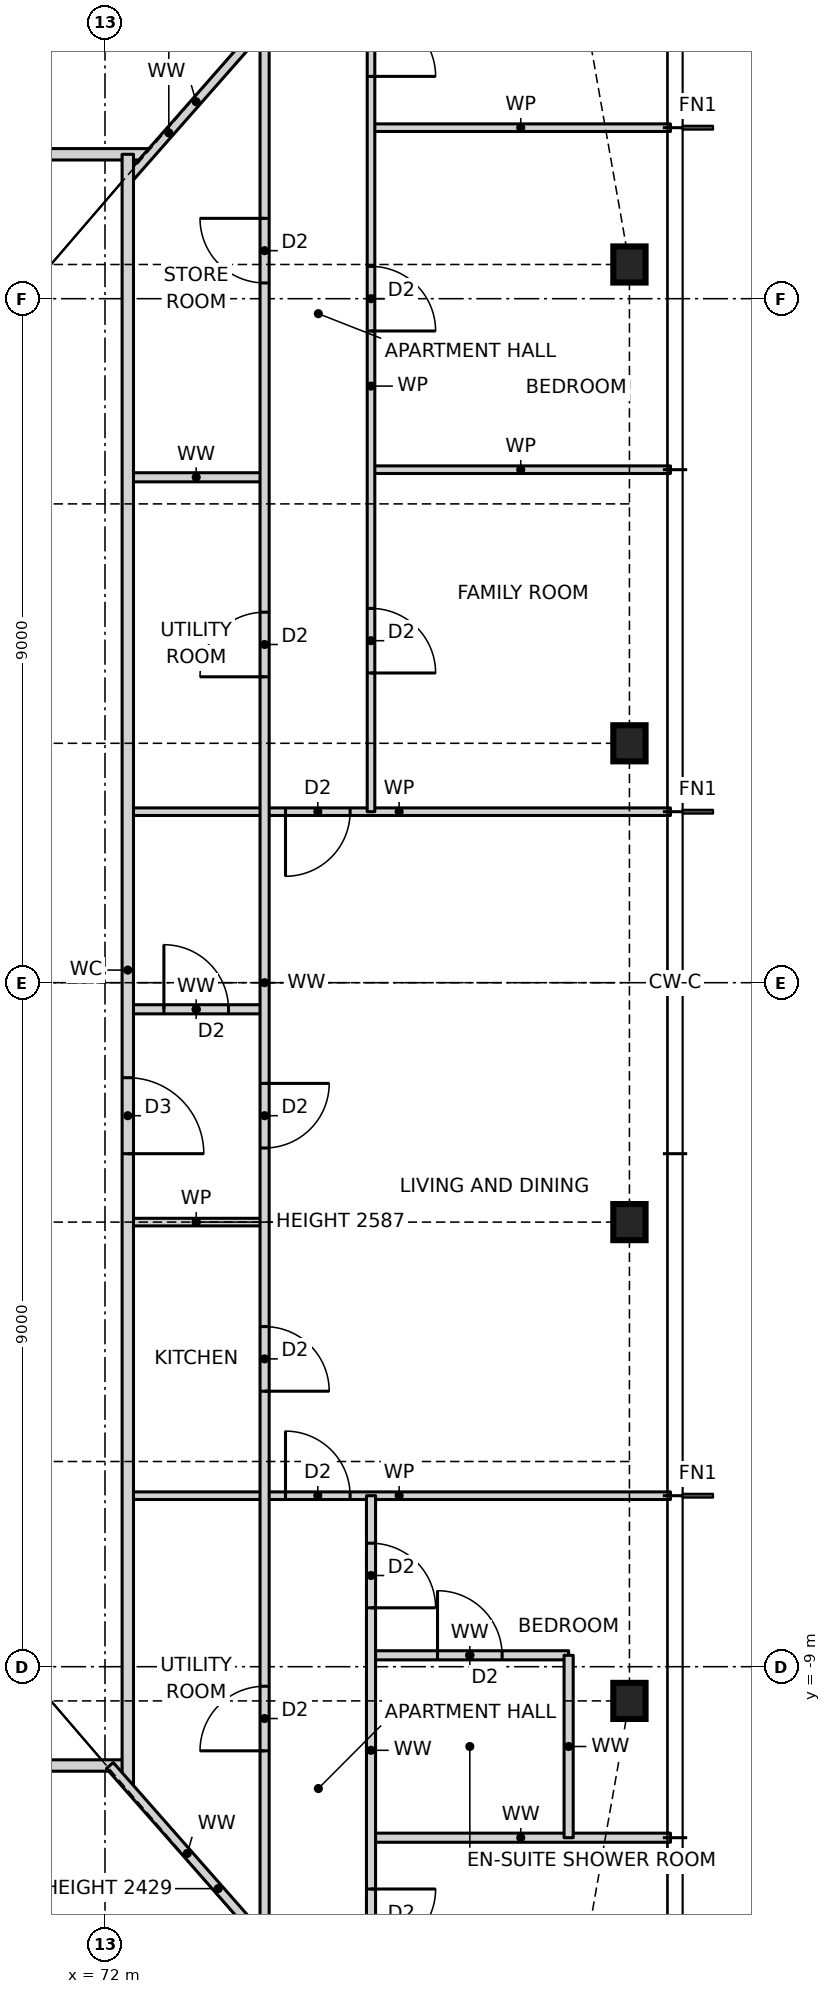
"""IFC4 building model, lengths in metres.
Left out: names, types, materials, properties, quantities, classifications, styles, units other than length and angle.
Written with IfcOpenShell. Run it as: python <this file> out.ifc"""

import sys

from ifc_helpers import new_model, si_unit, direction, frame, frame_2d, origin, origin_2d, place, context, subcontext, project, spatial, rectangle, i_section, extrude, element, fill, save


model = new_model("IFC4")
c1 = context("Model", 3, precision=1e-05, world=origin(), true_north=direction((0.0, 1.0)))
c2 = subcontext(c1, "Body", "Model", "MODEL_VIEW")
j1 = project(units=[si_unit("LENGTHUNIT", "METRE"), si_unit("PLANEANGLEUNIT", "RADIAN")], contexts=[c1])
p1 = place(None, origin())
s1 = spatial("IfcSite", under=j1, at=p1, CompositionType="ELEMENT")
p2 = place(p1, origin())
s2 = spatial("IfcBuilding", under=s1, at=p2, CompositionType="ELEMENT")
p3 = place(p2, frame((0.0, 0.0, 39.5)))
s3 = spatial("IfcBuildingStorey", under=s2, at=p3, CompositionType="ELEMENT", Elevation=39.5)
for number, where, z_axis, x_axis in (
    (1, (78.9, -9.45, 0.0), (0.0, 0.0, 1.0), (1.0, 0.0, 0.0)),
    (2, (78.9, -3.15, 0.0), (0.0, 0.0, 1.0), (1.0, 0.0, 0.0)),
    (3, (78.9, 3.15, 0.0), (0.0, 0.0, 1.0), (1.0, 0.0, 0.0)),
    (4, (78.9, 9.45, 0.0), (0.0, 0.0, 1.0), (1.0, 0.0, 0.0)),
):
    element("IfcColumn", number, at=place(p3, frame(where, z_axis=z_axis, x_axis=x_axis)), inside=s3, PredefinedType="COLUMN", context=c2, shape_type="SweptSolid", body=[
        extrude(i_section(OverallWidth=0.424, OverallDepth=0.475, WebThickness=0.048, FlangeThickness=0.077, at=origin_2d()), origin(), (0.0, 0.0, 1.0), 3.5),
    ])
p4 = place(p3, frame((75.5, -11.25, 0.0), z_axis=(0.0, 0.0, 1.0), x_axis=(1.0, 0.0, 0.0)))
e5 = element("IfcWall", 5, at=p4, inside=s3, PredefinedType="PARTITIONING", context=c2, shape_type="SweptSolid", body=[
    extrude(rectangle(XDim=3.94, YDim=0.12, at=frame_2d((1.97, 0.0))), origin(), (0.0, 0.0, 1.0), 3.27),
])
p5 = place(p3, frame((53.7, -10.3, 0.0), z_axis=(0.0, 0.0, 1.0), x_axis=(1.0, 0.0, 0.0)))
e6 = element("IfcWall", 6, at=p5, inside=s3, PredefinedType="PARTITIONING", context=c2, shape_type="SweptSolid", body=[
    extrude(rectangle(XDim=18.6, YDim=0.15, at=frame_2d((9.3, 0.0))), origin(), (0.0, 0.0, 1.0), 3.27),
])
p6 = place(p5, frame((4.8, 0.0, 0.0)))
e7 = element("IfcOpeningElement", 7, at=p6, cuts=e6, PredefinedType="OPENING", context=c2, shape_type="SweptSolid", body=[
    extrude(rectangle(XDim=1.0, YDim=2.1, at=frame_2d((0.5, 1.05))), frame((0.0, 0.085, 0.0), z_axis=(0.0, -1.0, 0.0), x_axis=(1.0, 0.0, 0.0)), (0.0, 0.0, 1.0), 0.17),
])
p7 = place(p3, frame((75.5, -8.85, 0.0), z_axis=(0.0, 0.0, 1.0), x_axis=(1.0, 0.0, 0.0)))
e8 = element("IfcWall", 8, at=p7, inside=s3, PredefinedType="PARTITIONING", context=c2, shape_type="SweptSolid", body=[
    extrude(rectangle(XDim=2.6, YDim=0.12, at=frame_2d((1.3, 0.0))), origin(), (0.0, 0.0, 1.0), 3.27),
])
p8 = place(p7, frame((0.875, 0.0, 0.0)))
e9 = element("IfcOpeningElement", 9, at=p8, cuts=e8, PredefinedType="OPENING", context=c2, shape_type="SweptSolid", body=[
    extrude(rectangle(XDim=0.85, YDim=2.1, at=frame_2d((0.425, 1.05))), frame((0.0, 0.07, 0.0), z_axis=(0.0, -1.0, 0.0), x_axis=(1.0, 0.0, 0.0)), (0.0, 0.0, 1.0), 0.14),
])
p9 = place(p3, frame((72.3, -6.75, 0.0), z_axis=(0.0, 0.0, 1.0), x_axis=(1.0, 0.0, 0.0)))
e10 = element("IfcWall", 10, at=p9, inside=s3, PredefinedType="PARTITIONING", context=c2, shape_type="SweptSolid", body=[
    extrude(rectangle(XDim=7.14, YDim=0.1, at=frame_2d((3.57, 0.0))), origin(), (0.0, 0.0, 1.0), 3.27),
])
p10 = place(p9, frame((2.075, 0.0, 0.0)))
e11 = element("IfcOpeningElement", 11, at=p10, cuts=e10, PredefinedType="OPENING", context=c2, shape_type="SweptSolid", body=[
    extrude(rectangle(XDim=0.85, YDim=2.1, at=frame_2d((0.425, 1.05))), frame((0.0, 0.06, 0.0), z_axis=(0.0, -1.0, 0.0), x_axis=(1.0, 0.0, 0.0)), (0.0, 0.0, 1.0), 0.12),
])
p11 = place(p3, frame((72.3, -3.15, 0.0), z_axis=(0.0, 0.0, 1.0), x_axis=(1.0, 0.0, 0.0)))
e12 = element("IfcWall", 12, at=p11, inside=s3, PredefinedType="PARTITIONING", context=c2, shape_type="SweptSolid", body=[
    extrude(rectangle(XDim=1.8, YDim=0.1, at=frame_2d((0.9, 0.0))), origin(), (0.0, 0.0, 1.0), 2.587),
])
p12 = place(p3, frame((72.3, -0.35, 0.0), z_axis=(0.0, 0.0, 1.0), x_axis=(1.0, 0.0, 0.0)))
e13 = element("IfcWall", 13, at=p12, inside=s3, PredefinedType="PARTITIONING", context=c2, shape_type="SweptSolid", body=[
    extrude(rectangle(XDim=1.8, YDim=0.12, at=frame_2d((0.9, 0.0))), origin(), (0.0, 0.0, 1.0), 3.27),
])
p13 = place(p12, frame((0.475, 0.0, 0.0)))
e14 = element("IfcOpeningElement", 14, at=p13, cuts=e13, PredefinedType="OPENING", context=c2, shape_type="SweptSolid", body=[
    extrude(rectangle(XDim=0.85, YDim=2.1, at=frame_2d((0.425, 1.05))), frame((0.0, 0.07, 0.0), z_axis=(0.0, -1.0, 0.0), x_axis=(1.0, 0.0, 0.0)), (0.0, 0.0, 1.0), 0.14),
])
p14 = place(p3, frame((72.3, 2.25, 0.0), z_axis=(0.0, 0.0, 1.0), x_axis=(1.0, 0.0, 0.0)))
e15 = element("IfcWall", 15, at=p14, inside=s3, PredefinedType="PARTITIONING", context=c2, shape_type="SweptSolid", body=[
    extrude(rectangle(XDim=7.14, YDim=0.1, at=frame_2d((3.57, 0.0))), origin(), (0.0, 0.0, 1.0), 3.27),
])
p15 = place(p14, frame((2.075, 0.0, 0.0)))
e16 = element("IfcOpeningElement", 16, at=p15, cuts=e15, PredefinedType="OPENING", context=c2, shape_type="SweptSolid", body=[
    extrude(rectangle(XDim=0.85, YDim=2.1, at=frame_2d((0.425, 1.05))), frame((0.0, 0.06, 0.0), z_axis=(0.0, -1.0, 0.0), x_axis=(1.0, 0.0, 0.0)), (0.0, 0.0, 1.0), 0.12),
])
p16 = place(p3, frame((72.3, 6.65, 0.0), z_axis=(0.0, 0.0, 1.0), x_axis=(1.0, 0.0, 0.0)))
e17 = element("IfcWall", 17, at=p16, inside=s3, PredefinedType="PARTITIONING", context=c2, shape_type="SweptSolid", body=[
    extrude(rectangle(XDim=1.8, YDim=0.12, at=frame_2d((0.9, 0.0))), origin(), (0.0, 0.0, 1.0), 3.27),
])
p17 = place(p3, frame((75.5, 6.75, 0.0), z_axis=(0.0, 0.0, 1.0), x_axis=(1.0, 0.0, 0.0)))
e18 = element("IfcWall", 18, at=p17, inside=s3, PredefinedType="PARTITIONING", context=c2, shape_type="SweptSolid", body=[
    extrude(rectangle(XDim=3.94, YDim=0.1, at=frame_2d((1.97, 0.0))), origin(), (0.0, 0.0, 1.0), 3.27),
])
p18 = place(p3, frame((53.408, 10.9, 0.0), z_axis=(0.0, 0.0, 1.0), x_axis=(1.0, 0.0, 0.0)))
e19 = element("IfcWall", 19, at=p18, inside=s3, PredefinedType="PARTITIONING", context=c2, shape_type="SweptSolid", body=[
    extrude(rectangle(XDim=19.184, YDim=0.15, at=frame_2d((9.592, 0.0))), origin(), (0.0, 0.0, 1.0), 3.27),
])
p19 = place(p18, frame((8.592, 0.0, 0.0)))
e20 = element("IfcOpeningElement", 20, at=p19, cuts=e19, PredefinedType="OPENING", context=c2, shape_type="SweptSolid", body=[
    extrude(rectangle(XDim=1.0, YDim=2.1, at=frame_2d((0.5, 1.05))), frame((0.0, 0.085, 0.0), z_axis=(0.0, -1.0, 0.0), x_axis=(1.0, 0.0, 0.0)), (0.0, 0.0, 1.0), 0.17),
])
p20 = place(p3, frame((75.5, 11.25, 0.0), z_axis=(0.0, 0.0, 1.0), x_axis=(1.0, 0.0, 0.0)))
e21 = element("IfcWall", 21, at=p20, inside=s3, PredefinedType="PARTITIONING", context=c2, shape_type="SweptSolid", body=[
    extrude(rectangle(XDim=3.94, YDim=0.1, at=frame_2d((1.97, 0.0))), origin(), (0.0, 0.0, 1.0), 3.27),
])
p21 = place(p3, frame((72.299, 10.569, 0.0), z_axis=(0.0, 0.0, 1.0), x_axis=(0.660797520752, 0.750564212155, 0.0)))
e22 = element("IfcWall", 22, at=p21, inside=s3, PredefinedType="PARTITIONING", context=c2, shape_type="SweptSolid", body=[
    extrude(rectangle(XDim=2.725, YDim=0.12, at=frame_2d((1.363, 0.0))), origin(), (0.0, 0.0, 1.0), 2.429),
])
p22 = place(p3, frame((78.1, -11.25, 0.0), z_axis=(0.0, 0.0, 1.0), x_axis=(0.0, 1.0, 0.0)))
e23 = element("IfcWall", 23, at=p22, inside=s3, PredefinedType="PARTITIONING", context=c2, shape_type="SweptSolid", body=[
    extrude(rectangle(XDim=2.4, YDim=0.12, at=frame_2d((1.2, 0.0))), origin(), (0.0, 0.0, 1.0), 3.27),
])
p23 = place(p3, frame((75.5, -13.45, 0.0), z_axis=(0.0, 0.0, 1.0), x_axis=(0.0, 1.0, 0.0)))
e24 = element("IfcWall", 24, at=p23, inside=s3, PredefinedType="PARTITIONING", context=c2, shape_type="SweptSolid", body=[
    extrude(rectangle(XDim=6.7, YDim=0.12, at=frame_2d((3.35, 0.0))), origin(), (0.0, 0.0, 1.0), 3.27),
])
p24 = place(p23, frame((5.225, 0.0, 0.0)))
e25 = element("IfcOpeningElement", 25, at=p24, cuts=e24, PredefinedType="OPENING", context=c2, shape_type="SweptSolid", body=[
    extrude(rectangle(XDim=0.85, YDim=2.1, at=frame_2d((0.425, 1.05))), frame((0.0, 0.07, 0.0), z_axis=(0.0, -1.0, 0.0), x_axis=(1.0, 0.0, 0.0)), (0.0, 0.0, 1.0), 0.14),
])
p25 = place(p23, frame((0.675, 0.0, 0.0)))
e26 = element("IfcOpeningElement", 26, at=p25, cuts=e24, PredefinedType="OPENING", context=c2, shape_type="SweptSolid", body=[
    extrude(rectangle(XDim=0.85, YDim=2.1, at=frame_2d((0.425, 1.05))), frame((0.0, 0.07, 0.0), z_axis=(0.0, -1.0, 0.0), x_axis=(1.0, 0.0, 0.0)), (0.0, 0.0, 1.0), 0.14),
])
p26 = place(p3, frame((75.5, 2.25, 0.0), z_axis=(0.0, 0.0, 1.0), x_axis=(0.0, 1.0, 0.0)))
e27 = element("IfcWall", 27, at=p26, inside=s3, PredefinedType="PARTITIONING", context=c2, shape_type="SweptSolid", body=[
    extrude(rectangle(XDim=11.2, YDim=0.1, at=frame_2d((5.6, 0.0))), origin(), (0.0, 0.0, 1.0), 3.27),
])
p27 = place(p26, frame((1.825, 0.0, 0.0)))
e28 = element("IfcOpeningElement", 28, at=p27, cuts=e27, PredefinedType="OPENING", context=c2, shape_type="SweptSolid", body=[
    extrude(rectangle(XDim=0.85, YDim=2.1, at=frame_2d((0.425, 1.05))), frame((0.0, 0.06, 0.0), z_axis=(0.0, -1.0, 0.0), x_axis=(1.0, 0.0, 0.0)), (0.0, 0.0, 1.0), 0.12),
])
p28 = place(p26, frame((6.325, 0.0, 0.0)))
e29 = element("IfcOpeningElement", 29, at=p28, cuts=e27, PredefinedType="OPENING", context=c2, shape_type="SweptSolid", body=[
    extrude(rectangle(XDim=0.85, YDim=2.1, at=frame_2d((0.425, 1.05))), frame((0.0, 0.06, 0.0), z_axis=(0.0, -1.0, 0.0), x_axis=(1.0, 0.0, 0.0)), (0.0, 0.0, 1.0), 0.12),
])
p29 = place(p26, frame((9.675, 0.0, 0.0)))
e30 = element("IfcOpeningElement", 30, at=p29, cuts=e27, PredefinedType="OPENING", context=c2, shape_type="SweptSolid", body=[
    extrude(rectangle(XDim=0.85, YDim=2.1, at=frame_2d((0.425, 1.05))), frame((0.0, 0.06, 0.0), z_axis=(0.0, -1.0, 0.0), x_axis=(1.0, 0.0, 0.0)), (0.0, 0.0, 1.0), 0.12),
])
p30 = place(p3, frame((74.1, -12.614, 0.0), z_axis=(0.0, 0.0, 1.0), x_axis=(0.0, 1.0, 0.0)))
e31 = element("IfcWall", 31, at=p30, inside=s3, PredefinedType="PARTITIONING", context=c2, shape_type="SweptSolid", body=[
    extrude(rectangle(XDim=25.228, YDim=0.12, at=frame_2d((12.614, 0.0))), origin(), (0.0, 0.0, 1.0), 3.27),
])
p31 = place(p30, frame((7.239, 0.0, 0.0)))
e32 = element("IfcOpeningElement", 32, at=p31, cuts=e31, PredefinedType="OPENING", context=c2, shape_type="SweptSolid", body=[
    extrude(rectangle(XDim=0.85, YDim=2.1, at=frame_2d((0.425, 1.05))), frame((0.0, 0.07, 0.0), z_axis=(0.0, -1.0, 0.0), x_axis=(1.0, 0.0, 0.0)), (0.0, 0.0, 1.0), 0.14),
])
p32 = place(p30, frame((10.439, 0.0, 0.0)))
e33 = element("IfcOpeningElement", 33, at=p32, cuts=e31, PredefinedType="OPENING", context=c2, shape_type="SweptSolid", body=[
    extrude(rectangle(XDim=0.85, YDim=2.1, at=frame_2d((0.425, 1.05))), frame((0.0, 0.07, 0.0), z_axis=(0.0, -1.0, 0.0), x_axis=(1.0, 0.0, 0.0)), (0.0, 0.0, 1.0), 0.14),
])
p33 = place(p30, frame((2.507, 0.0, 0.0)))
e34 = element("IfcOpeningElement", 34, at=p33, cuts=e31, PredefinedType="OPENING", context=c2, shape_type="SweptSolid", body=[
    extrude(rectangle(XDim=0.85, YDim=2.1, at=frame_2d((0.425, 1.05))), frame((0.0, 0.07, 0.0), z_axis=(0.0, -1.0, 0.0), x_axis=(1.0, 0.0, 0.0)), (0.0, 0.0, 1.0), 0.14),
])
p34 = place(p30, frame((16.639, 0.0, 0.0)))
e35 = element("IfcOpeningElement", 35, at=p34, cuts=e31, PredefinedType="OPENING", context=c2, shape_type="SweptSolid", body=[
    extrude(rectangle(XDim=0.85, YDim=2.1, at=frame_2d((0.425, 1.05))), frame((0.0, 0.07, 0.0), z_axis=(0.0, -1.0, 0.0), x_axis=(1.0, 0.0, 0.0)), (0.0, 0.0, 1.0), 0.14),
])
p35 = place(p30, frame((21.821, 0.0, 0.0)))
e36 = element("IfcOpeningElement", 36, at=p35, cuts=e31, PredefinedType="OPENING", context=c2, shape_type="SweptSolid", body=[
    extrude(rectangle(XDim=0.85, YDim=2.1, at=frame_2d((0.425, 1.05))), frame((0.0, 0.07, 0.0), z_axis=(0.0, -1.0, 0.0), x_axis=(1.0, 0.0, 0.0)), (0.0, 0.0, 1.0), 0.14),
])
p36 = place(p3, frame((72.3, -10.568, 0.0), z_axis=(0.0, 0.0, 1.0), x_axis=(0.0, 1.0, 0.0)))
e37 = element("IfcWall", 37, at=p36, inside=s3, PredefinedType="PARTITIONING", context=c2, shape_type="SweptSolid", body=[
    extrude(rectangle(XDim=21.468, YDim=0.15, at=frame_2d((10.734, 0.0))), origin(), (0.0, 0.0, 1.0), 3.27),
])
p37 = place(p36, frame((8.318, 0.0, 0.0)))
e38 = element("IfcOpeningElement", 38, at=p37, cuts=e37, PredefinedType="OPENING", context=c2, shape_type="SweptSolid", body=[
    extrude(rectangle(XDim=1.0, YDim=2.1, at=frame_2d((0.5, 1.05))), frame((0.0, 0.085, 0.0), z_axis=(0.0, -1.0, 0.0), x_axis=(1.0, 0.0, 0.0)), (0.0, 0.0, 1.0), 0.17),
])
p38 = place(p3, frame((74.1, -12.614, 0.0), z_axis=(0.0, 0.0, 1.0), x_axis=(-0.660767161141, 0.750590939699, 0.0)))
e39 = element("IfcWall", 39, at=p38, inside=s3, PredefinedType="PARTITIONING", context=c2, shape_type="SweptSolid", body=[
    extrude(rectangle(XDim=3.082, YDim=0.12, at=frame_2d((1.541, 0.0))), origin(), (0.0, 0.0, 1.0), 2.429),
])
p39 = place(p31, frame((0.85, 0.0, 0.0), z_axis=(0.0, 0.0, 1.0), x_axis=(-1.0, 0.0, 0.0)))
e40 = element("IfcDoor", 40, at=p39, inside=s3, OperationType="SINGLE_SWING_RIGHT", PredefinedType="DOOR", context=c2, shape_type="SweptSolid", body=[
    extrude(rectangle(XDim=0.85, YDim=2.1, at=frame_2d((0.425, 1.05))), frame((0.0, 0.025, 0.0), z_axis=(0.0, -1.0, 0.0), x_axis=(1.0, 0.0, 0.0)), (0.0, 0.0, 1.0), 0.05),
])
fill(e32, e40)
p40 = place(p37, frame((1.0, 0.0, 0.0), z_axis=(0.0, 0.0, 1.0), x_axis=(-1.0, 0.0, 0.0)))
e41 = element("IfcDoor", 41, at=p40, inside=s3, OperationType="SINGLE_SWING_RIGHT", PredefinedType="DOOR", context=c2, shape_type="SweptSolid", body=[
    extrude(rectangle(XDim=1.0, YDim=2.1, at=frame_2d((0.5, 1.05))), frame((0.0, 0.025, 0.0), z_axis=(0.0, -1.0, 0.0), x_axis=(1.0, 0.0, 0.0)), (0.0, 0.0, 1.0), 0.05),
])
fill(e38, e41)
p41 = place(p32, frame((0.85, 0.0, 0.0), z_axis=(0.0, 0.0, 1.0), x_axis=(-1.0, 0.0, 0.0)))
e42 = element("IfcDoor", 42, at=p41, inside=s3, OperationType="SINGLE_SWING_LEFT", PredefinedType="DOOR", context=c2, shape_type="SweptSolid", body=[
    extrude(rectangle(XDim=0.85, YDim=2.1, at=frame_2d((0.425, 1.05))), frame((0.0, 0.025, 0.0), z_axis=(0.0, -1.0, 0.0), x_axis=(1.0, 0.0, 0.0)), (0.0, 0.0, 1.0), 0.05),
])
fill(e33, e42)
p42 = place(p13, origin())
e43 = element("IfcDoor", 43, at=p42, inside=s3, OperationType="SINGLE_SWING_LEFT", PredefinedType="DOOR", context=c2, shape_type="SweptSolid", body=[
    extrude(rectangle(XDim=0.85, YDim=2.1, at=frame_2d((0.425, 1.05))), frame((0.0, 0.025, 0.0), z_axis=(0.0, -1.0, 0.0), x_axis=(1.0, 0.0, 0.0)), (0.0, 0.0, 1.0), 0.05),
])
fill(e14, e43)
p43 = place(p10, origin())
e44 = element("IfcDoor", 44, at=p43, inside=s3, OperationType="SINGLE_SWING_LEFT", PredefinedType="DOOR", context=c2, shape_type="SweptSolid", body=[
    extrude(rectangle(XDim=0.85, YDim=2.1, at=frame_2d((0.425, 1.05))), frame((0.0, 0.025, 0.0), z_axis=(0.0, -1.0, 0.0), x_axis=(1.0, 0.0, 0.0)), (0.0, 0.0, 1.0), 0.05),
])
fill(e11, e44)
p44 = place(p8, origin())
e45 = element("IfcDoor", 45, at=p44, inside=s3, OperationType="SINGLE_SWING_LEFT", PredefinedType="DOOR", context=c2, shape_type="SweptSolid", body=[
    extrude(rectangle(XDim=0.85, YDim=2.1, at=frame_2d((0.425, 1.05))), frame((0.0, 0.025, 0.0), z_axis=(0.0, -1.0, 0.0), x_axis=(1.0, 0.0, 0.0)), (0.0, 0.0, 1.0), 0.05),
])
fill(e9, e45)
p45 = place(p24, frame((0.85, 0.0, 0.0), z_axis=(0.0, 0.0, 1.0), x_axis=(-1.0, 0.0, 0.0)))
e46 = element("IfcDoor", 46, at=p45, inside=s3, OperationType="SINGLE_SWING_RIGHT", PredefinedType="DOOR", context=c2, shape_type="SweptSolid", body=[
    extrude(rectangle(XDim=0.85, YDim=2.1, at=frame_2d((0.425, 1.05))), frame((0.0, 0.025, 0.0), z_axis=(0.0, -1.0, 0.0), x_axis=(1.0, 0.0, 0.0)), (0.0, 0.0, 1.0), 0.05),
])
fill(e25, e46)
p46 = place(p25, frame((0.85, 0.0, 0.0), z_axis=(0.0, 0.0, 1.0), x_axis=(-1.0, 0.0, 0.0)))
e47 = element("IfcDoor", 47, at=p46, inside=s3, OperationType="SINGLE_SWING_LEFT", PredefinedType="DOOR", context=c2, shape_type="SweptSolid", body=[
    extrude(rectangle(XDim=0.85, YDim=2.1, at=frame_2d((0.425, 1.05))), frame((0.0, 0.025, 0.0), z_axis=(0.0, -1.0, 0.0), x_axis=(1.0, 0.0, 0.0)), (0.0, 0.0, 1.0), 0.05),
])
fill(e26, e47)
p47 = place(p33, origin())
e48 = element("IfcDoor", 48, at=p47, inside=s3, OperationType="SINGLE_SWING_LEFT", PredefinedType="DOOR", context=c2, shape_type="SweptSolid", body=[
    extrude(rectangle(XDim=0.85, YDim=2.1, at=frame_2d((0.425, 1.05))), frame((0.0, 0.025, 0.0), z_axis=(0.0, -1.0, 0.0), x_axis=(1.0, 0.0, 0.0)), (0.0, 0.0, 1.0), 0.05),
])
fill(e34, e48)
p48 = place(p15, frame((0.85, 0.0, 0.0), z_axis=(0.0, 0.0, 1.0), x_axis=(-1.0, 0.0, 0.0)))
e49 = element("IfcDoor", 49, at=p48, inside=s3, OperationType="SINGLE_SWING_RIGHT", PredefinedType="DOOR", context=c2, shape_type="SweptSolid", body=[
    extrude(rectangle(XDim=0.85, YDim=2.1, at=frame_2d((0.425, 1.05))), frame((0.0, 0.025, 0.0), z_axis=(0.0, -1.0, 0.0), x_axis=(1.0, 0.0, 0.0)), (0.0, 0.0, 1.0), 0.05),
])
fill(e16, e49)
p49 = place(p27, frame((0.85, 0.0, 0.0), z_axis=(0.0, 0.0, 1.0), x_axis=(-1.0, 0.0, 0.0)))
e50 = element("IfcDoor", 50, at=p49, inside=s3, OperationType="SINGLE_SWING_RIGHT", PredefinedType="DOOR", context=c2, shape_type="SweptSolid", body=[
    extrude(rectangle(XDim=0.85, YDim=2.1, at=frame_2d((0.425, 1.05))), frame((0.0, 0.025, 0.0), z_axis=(0.0, -1.0, 0.0), x_axis=(1.0, 0.0, 0.0)), (0.0, 0.0, 1.0), 0.05),
])
fill(e28, e50)
p50 = place(p28, frame((0.85, 0.0, 0.0), z_axis=(0.0, 0.0, 1.0), x_axis=(-1.0, 0.0, 0.0)))
e51 = element("IfcDoor", 51, at=p50, inside=s3, OperationType="SINGLE_SWING_RIGHT", PredefinedType="DOOR", context=c2, shape_type="SweptSolid", body=[
    extrude(rectangle(XDim=0.85, YDim=2.1, at=frame_2d((0.425, 1.05))), frame((0.0, 0.025, 0.0), z_axis=(0.0, -1.0, 0.0), x_axis=(1.0, 0.0, 0.0)), (0.0, 0.0, 1.0), 0.05),
])
fill(e29, e51)
p51 = place(p29, frame((0.85, 0.0, 0.0), z_axis=(0.0, 0.0, 1.0), x_axis=(-1.0, 0.0, 0.0)))
e52 = element("IfcDoor", 52, at=p51, inside=s3, OperationType="SINGLE_SWING_RIGHT", PredefinedType="DOOR", context=c2, shape_type="SweptSolid", body=[
    extrude(rectangle(XDim=0.85, YDim=2.1, at=frame_2d((0.425, 1.05))), frame((0.0, 0.025, 0.0), z_axis=(0.0, -1.0, 0.0), x_axis=(1.0, 0.0, 0.0)), (0.0, 0.0, 1.0), 0.05),
])
fill(e30, e52)
p52 = place(p34, origin())
e53 = element("IfcDoor", 53, at=p52, inside=s3, OperationType="SINGLE_SWING_LEFT", PredefinedType="DOOR", context=c2, shape_type="SweptSolid", body=[
    extrude(rectangle(XDim=0.85, YDim=2.1, at=frame_2d((0.425, 1.05))), frame((0.0, 0.025, 0.0), z_axis=(0.0, -1.0, 0.0), x_axis=(1.0, 0.0, 0.0)), (0.0, 0.0, 1.0), 0.05),
])
fill(e35, e53)
p53 = place(p35, origin())
e54 = element("IfcDoor", 54, at=p53, inside=s3, OperationType="SINGLE_SWING_RIGHT", PredefinedType="DOOR", context=c2, shape_type="SweptSolid", body=[
    extrude(rectangle(XDim=0.85, YDim=2.1, at=frame_2d((0.425, 1.05))), frame((0.0, 0.025, 0.0), z_axis=(0.0, -1.0, 0.0), x_axis=(1.0, 0.0, 0.0)), (0.0, 0.0, 1.0), 0.05),
])
fill(e36, e54)
save(model, sys.argv[1])
